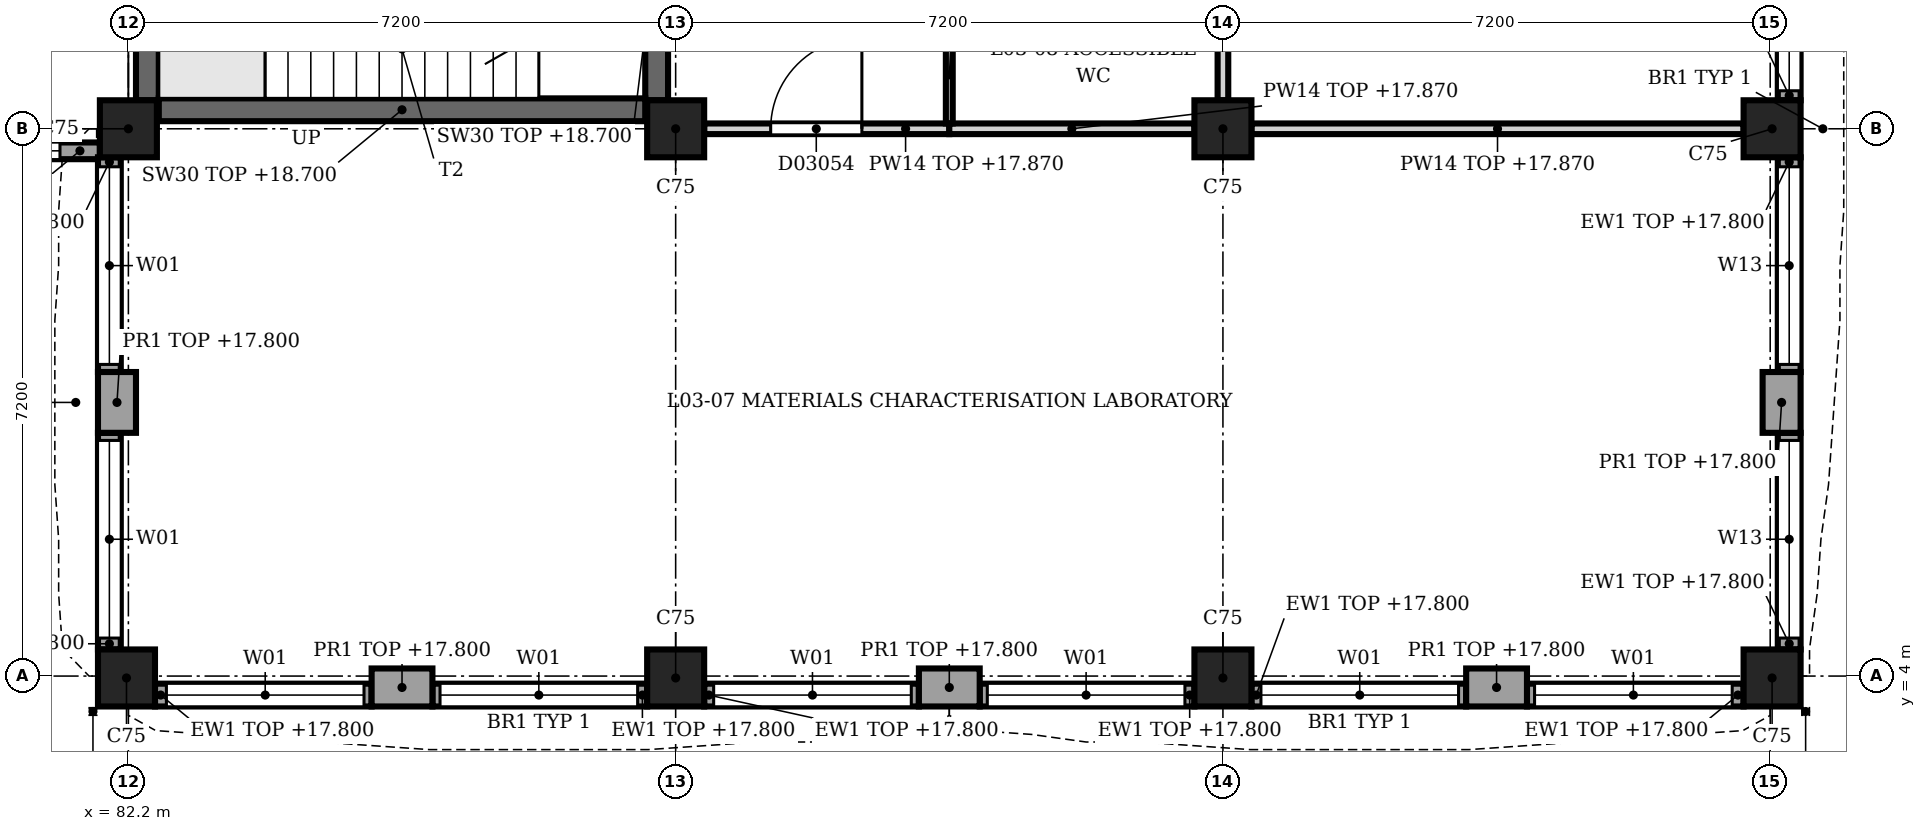
"""IFC4 building model, lengths in metres.
Left out: names, types, materials, properties, quantities, classifications, styles, units other than length and angle.
Written with IfcOpenShell. Run it as: python <this file> out.ifc"""

import sys

from ifc_helpers import new_model, si_unit, direction, frame, frame_2d, origin, origin_2d, place, context, subcontext, project, spatial, rectangle, extrude, element, fill, save


model = new_model("IFC4")
c1 = context("Model", 3, precision=1e-05, world=origin(), true_north=direction((0.0, 1.0)))
c2 = subcontext(c1, "Body", "Model", "MODEL_VIEW")
j1 = project(units=[si_unit("LENGTHUNIT", "METRE"), si_unit("PLANEANGLEUNIT", "RADIAN")], contexts=[c1])
p1 = place(None, origin())
s1 = spatial("IfcSite", under=j1, at=p1, CompositionType="ELEMENT")
p2 = place(p1, origin())
s2 = spatial("IfcBuilding", under=s1, at=p2, CompositionType="ELEMENT")
p3 = place(p2, frame((0.0, 0.0, 14.4)))
s3 = spatial("IfcBuildingStorey", under=s2, at=p3, CompositionType="ELEMENT", Elevation=14.4)
for number, where, z_axis, x_axis in (
    (1, (82.175, 3.975, 0.0), (0.0, 0.0, 1.0), (1.0, 0.0, 0.0)),
    (2, (82.2, 11.2, 0.0), (0.0, 0.0, 1.0), (1.0, 0.0, 0.0)),
    (3, (89.4, 3.975, 0.0), (0.0, 0.0, 1.0), (1.0, 0.0, 0.0)),
    (4, (89.4, 11.2, 0.0), (0.0, 0.0, 1.0), (1.0, 0.0, 0.0)),
    (5, (96.6, 3.975, 0.0), (0.0, 0.0, 1.0), (1.0, 0.0, 0.0)),
    (6, (96.6, 11.2, 0.0), (0.0, 0.0, 1.0), (1.0, 0.0, 0.0)),
    (7, (103.825, 3.975, 0.0), (0.0, 0.0, 1.0), (1.0, 0.0, 0.0)),
    (8, (103.825, 11.2, 0.0), (0.0, 0.0, 1.0), (1.0, 0.0, 0.0)),
):
    element("IfcColumn", number, at=place(p3, frame(where, z_axis=z_axis, x_axis=x_axis)), inside=s3, PredefinedType="COLUMN", context=c2, shape_type="SweptSolid", body=[
        extrude(rectangle(XDim=0.75, YDim=0.75, at=origin_2d()), origin(), (0.0, 0.0, 1.0), 4.5),
    ])
p4 = place(p3, frame((103.95, 8.0, 0.0), z_axis=(0.0, 0.0, 1.0), x_axis=(0.0, -1.0, 0.0)))
e9 = element("IfcWall", 9, at=p4, inside=s3, PredefinedType="SOLIDWALL", context=c2, shape_type="SweptSolid", body=[
    extrude(rectangle(XDim=0.8, YDim=0.5, at=frame_2d((0.4, 0.0))), origin(), (0.0, 0.0, 1.0), 3.4),
])
p5 = place(p3, frame((104.05, 14.4, 0.0), z_axis=(0.0, 0.0, 1.0), x_axis=(0.0, -1.0, 0.0)))
e10 = element("IfcWall", 10, at=p5, inside=s3, PredefinedType="SOLIDWALL", context=c2, shape_type="SweptSolid", body=[
    extrude(rectangle(XDim=2.825, YDim=0.3, at=frame_2d((1.413, 0.0))), origin(), (0.0, 0.0, 1.0), 3.4),
])
p6 = place(p5, frame((0.1, 0.0, 0.9)))
e11 = element("IfcOpeningElement", 11, at=p6, cuts=e10, PredefinedType="OPENING", context=c2, shape_type="SweptSolid", body=[
    extrude(rectangle(XDim=2.6, YDim=2.2, at=frame_2d((1.3, 1.1))), frame((0.0, 0.16, 0.0), z_axis=(0.0, -1.0, 0.0), x_axis=(1.0, 0.0, 0.0)), (0.0, 0.0, 1.0), 0.32),
])
p7 = place(p3, frame((104.05, 10.825, 0.0), z_axis=(0.0, 0.0, 1.0), x_axis=(0.0, -1.0, 0.0)))
e12 = element("IfcWall", 12, at=p7, inside=s3, PredefinedType="SOLIDWALL", context=c2, shape_type="SweptSolid", body=[
    extrude(rectangle(XDim=2.825, YDim=0.3, at=frame_2d((1.413, 0.0))), origin(), (0.0, 0.0, 1.0), 3.4),
])
p8 = place(p7, frame((0.125, 0.0, 0.9)))
e13 = element("IfcOpeningElement", 13, at=p8, cuts=e12, PredefinedType="OPENING", context=c2, shape_type="SweptSolid", body=[
    extrude(rectangle(XDim=2.6, YDim=2.2, at=frame_2d((1.3, 1.1))), frame((0.0, 0.16, 0.0), z_axis=(0.0, -1.0, 0.0), x_axis=(1.0, 0.0, 0.0)), (0.0, 0.0, 1.0), 0.32),
])
p9 = place(p3, frame((104.05, 7.2, 0.0), z_axis=(0.0, 0.0, 1.0), x_axis=(0.0, -1.0, 0.0)))
e14 = element("IfcWall", 14, at=p9, inside=s3, PredefinedType="SOLIDWALL", context=c2, shape_type="SweptSolid", body=[
    extrude(rectangle(XDim=2.85, YDim=0.3, at=frame_2d((1.425, 0.0))), origin(), (0.0, 0.0, 1.0), 3.4),
])
p10 = place(p9, frame((0.1, 0.0, 0.9)))
e15 = element("IfcOpeningElement", 15, at=p10, cuts=e14, PredefinedType="OPENING", context=c2, shape_type="SweptSolid", body=[
    extrude(rectangle(XDim=2.6, YDim=2.2, at=frame_2d((1.3, 1.1))), frame((0.0, 0.16, 0.0), z_axis=(0.0, -1.0, 0.0), x_axis=(1.0, 0.0, 0.0)), (0.0, 0.0, 1.0), 0.32),
])
p11 = place(p3, frame((100.6, 3.85, 0.0), z_axis=(0.0, 0.0, 1.0), x_axis=(-1.0, 0.0, 0.0)))
e16 = element("IfcWall", 16, at=p11, inside=s3, PredefinedType="SOLIDWALL", context=c2, shape_type="SweptSolid", body=[
    extrude(rectangle(XDim=0.8, YDim=0.5, at=frame_2d((0.4, 0.0))), origin(), (0.0, 0.0, 1.0), 3.4),
])
p12 = place(p3, frame((93.4, 3.85, 0.0), z_axis=(0.0, 0.0, 1.0), x_axis=(-1.0, 0.0, 0.0)))
e17 = element("IfcWall", 17, at=p12, inside=s3, PredefinedType="SOLIDWALL", context=c2, shape_type="SweptSolid", body=[
    extrude(rectangle(XDim=0.8, YDim=0.5, at=frame_2d((0.4, 0.0))), origin(), (0.0, 0.0, 1.0), 3.4),
])
p13 = place(p3, frame((86.2, 3.85, 0.0), z_axis=(0.0, 0.0, 1.0), x_axis=(-1.0, 0.0, 0.0)))
e18 = element("IfcWall", 18, at=p13, inside=s3, PredefinedType="SOLIDWALL", context=c2, shape_type="SweptSolid", body=[
    extrude(rectangle(XDim=0.8, YDim=0.5, at=frame_2d((0.4, 0.0))), origin(), (0.0, 0.0, 1.0), 3.4),
])
p14 = place(p3, frame((103.45, 3.75, 0.0), z_axis=(0.0, 0.0, 1.0), x_axis=(-1.0, 0.0, 0.0)))
e19 = element("IfcWall", 19, at=p14, inside=s3, PredefinedType="SOLIDWALL", context=c2, shape_type="SweptSolid", body=[
    extrude(rectangle(XDim=2.85, YDim=0.3, at=frame_2d((1.425, 0.0))), origin(), (0.0, 0.0, 1.0), 3.4),
])
p15 = place(p14, frame((0.15, 0.0, 0.9)))
e20 = element("IfcOpeningElement", 20, at=p15, cuts=e19, PredefinedType="OPENING", context=c2, shape_type="SweptSolid", body=[
    extrude(rectangle(XDim=2.6, YDim=2.4, at=frame_2d((1.3, 1.2))), frame((0.0, 0.16, 0.0), z_axis=(0.0, -1.0, 0.0), x_axis=(1.0, 0.0, 0.0)), (0.0, 0.0, 1.0), 0.32),
])
p16 = place(p3, frame((99.8, 3.75, 0.0), z_axis=(0.0, 0.0, 1.0), x_axis=(-1.0, 0.0, 0.0)))
e21 = element("IfcWall", 21, at=p16, inside=s3, PredefinedType="SOLIDWALL", context=c2, shape_type="SweptSolid", body=[
    extrude(rectangle(XDim=2.825, YDim=0.3, at=frame_2d((1.413, 0.0))), origin(), (0.0, 0.0, 1.0), 3.4),
])
p17 = place(p16, frame((0.1, 0.0, 0.9)))
e22 = element("IfcOpeningElement", 22, at=p17, cuts=e21, PredefinedType="OPENING", context=c2, shape_type="SweptSolid", body=[
    extrude(rectangle(XDim=2.6, YDim=2.4, at=frame_2d((1.3, 1.2))), frame((0.0, 0.16, 0.0), z_axis=(0.0, -1.0, 0.0), x_axis=(1.0, 0.0, 0.0)), (0.0, 0.0, 1.0), 0.32),
])
p18 = place(p3, frame((96.225, 3.75, 0.0), z_axis=(0.0, 0.0, 1.0), x_axis=(-1.0, 0.0, 0.0)))
e23 = element("IfcWall", 23, at=p18, inside=s3, PredefinedType="SOLIDWALL", context=c2, shape_type="SweptSolid", body=[
    extrude(rectangle(XDim=2.825, YDim=0.3, at=frame_2d((1.413, 0.0))), origin(), (0.0, 0.0, 1.0), 3.4),
])
p19 = place(p18, frame((0.125, 0.0, 0.9)))
e24 = element("IfcOpeningElement", 24, at=p19, cuts=e23, PredefinedType="OPENING", context=c2, shape_type="SweptSolid", body=[
    extrude(rectangle(XDim=2.6, YDim=2.4, at=frame_2d((1.3, 1.2))), frame((0.0, 0.16, 0.0), z_axis=(0.0, -1.0, 0.0), x_axis=(1.0, 0.0, 0.0)), (0.0, 0.0, 1.0), 0.32),
])
p20 = place(p3, frame((92.6, 3.75, 0.0), z_axis=(0.0, 0.0, 1.0), x_axis=(-1.0, 0.0, 0.0)))
e25 = element("IfcWall", 25, at=p20, inside=s3, PredefinedType="SOLIDWALL", context=c2, shape_type="SweptSolid", body=[
    extrude(rectangle(XDim=2.825, YDim=0.3, at=frame_2d((1.413, 0.0))), origin(), (0.0, 0.0, 1.0), 3.4),
])
p21 = place(p20, frame((0.1, 0.0, 0.9)))
e26 = element("IfcOpeningElement", 26, at=p21, cuts=e25, PredefinedType="OPENING", context=c2, shape_type="SweptSolid", body=[
    extrude(rectangle(XDim=2.6, YDim=2.4, at=frame_2d((1.3, 1.2))), frame((0.0, 0.16, 0.0), z_axis=(0.0, -1.0, 0.0), x_axis=(1.0, 0.0, 0.0)), (0.0, 0.0, 1.0), 0.32),
])
p22 = place(p3, frame((89.025, 3.75, 0.0), z_axis=(0.0, 0.0, 1.0), x_axis=(-1.0, 0.0, 0.0)))
e27 = element("IfcWall", 27, at=p22, inside=s3, PredefinedType="SOLIDWALL", context=c2, shape_type="SweptSolid", body=[
    extrude(rectangle(XDim=2.825, YDim=0.3, at=frame_2d((1.413, 0.0))), origin(), (0.0, 0.0, 1.0), 3.4),
])
p23 = place(p22, frame((0.125, 0.0, 0.9)))
e28 = element("IfcOpeningElement", 28, at=p23, cuts=e27, PredefinedType="OPENING", context=c2, shape_type="SweptSolid", body=[
    extrude(rectangle(XDim=2.6, YDim=2.4, at=frame_2d((1.3, 1.2))), frame((0.0, 0.16, 0.0), z_axis=(0.0, -1.0, 0.0), x_axis=(1.0, 0.0, 0.0)), (0.0, 0.0, 1.0), 0.32),
])
p24 = place(p3, frame((85.4, 3.75, 0.0), z_axis=(0.0, 0.0, 1.0), x_axis=(-1.0, 0.0, 0.0)))
e29 = element("IfcWall", 29, at=p24, inside=s3, PredefinedType="SOLIDWALL", context=c2, shape_type="SweptSolid", body=[
    extrude(rectangle(XDim=2.85, YDim=0.3, at=frame_2d((1.425, 0.0))), origin(), (0.0, 0.0, 1.0), 3.4),
])
p25 = place(p24, frame((0.1, 0.0, 0.9)))
e30 = element("IfcOpeningElement", 30, at=p25, cuts=e29, PredefinedType="OPENING", context=c2, shape_type="SweptSolid", body=[
    extrude(rectangle(XDim=2.6, YDim=2.4, at=frame_2d((1.3, 1.2))), frame((0.0, 0.16, 0.0), z_axis=(0.0, -1.0, 0.0), x_axis=(1.0, 0.0, 0.0)), (0.0, 0.0, 1.0), 0.32),
])
p26 = place(p3, frame((82.05, 7.2, 0.0), z_axis=(0.0, 0.0, 1.0), x_axis=(0.0, 1.0, 0.0)))
e31 = element("IfcWall", 31, at=p26, inside=s3, PredefinedType="SOLIDWALL", context=c2, shape_type="SweptSolid", body=[
    extrude(rectangle(XDim=0.8, YDim=0.5, at=frame_2d((0.4, 0.0))), origin(), (0.0, 0.0, 1.0), 3.4),
])
p27 = place(p3, frame((81.95, 4.35, 0.0), z_axis=(0.0, 0.0, 1.0), x_axis=(0.0, 1.0, 0.0)))
e32 = element("IfcWall", 32, at=p27, inside=s3, PredefinedType="SOLIDWALL", context=c2, shape_type="SweptSolid", body=[
    extrude(rectangle(XDim=2.85, YDim=0.3, at=frame_2d((1.425, 0.0))), origin(), (0.0, 0.0, 1.0), 3.4),
])
p28 = place(p27, frame((0.15, 0.0, 0.9)))
e33 = element("IfcOpeningElement", 33, at=p28, cuts=e32, PredefinedType="OPENING", context=c2, shape_type="SweptSolid", body=[
    extrude(rectangle(XDim=2.6, YDim=2.4, at=frame_2d((1.3, 1.2))), frame((0.0, 0.16, 0.0), z_axis=(0.0, -1.0, 0.0), x_axis=(1.0, 0.0, 0.0)), (0.0, 0.0, 1.0), 0.32),
])
p29 = place(p3, frame((81.95, 8.0, 0.0), z_axis=(0.0, 0.0, 1.0), x_axis=(0.0, 1.0, 0.0)))
e34 = element("IfcWall", 34, at=p29, inside=s3, PredefinedType="SOLIDWALL", context=c2, shape_type="SweptSolid", body=[
    extrude(rectangle(XDim=2.825, YDim=0.3, at=frame_2d((1.413, 0.0))), origin(), (0.0, 0.0, 1.0), 3.4),
])
p30 = place(p29, frame((0.1, 0.0, 0.9)))
e35 = element("IfcOpeningElement", 35, at=p30, cuts=e34, PredefinedType="OPENING", context=c2, shape_type="SweptSolid", body=[
    extrude(rectangle(XDim=2.6, YDim=2.4, at=frame_2d((1.3, 1.2))), frame((0.0, 0.16, 0.0), z_axis=(0.0, -1.0, 0.0), x_axis=(1.0, 0.0, 0.0)), (0.0, 0.0, 1.0), 0.32),
])
p31 = place(p3, frame((81.825, 10.91, 0.0), z_axis=(0.0, 0.0, 1.0), x_axis=(-1.0, 0.0, 0.0)))
e36 = element("IfcWall", 36, at=p31, inside=s3, PredefinedType="SOLIDWALL", context=c2, shape_type="SweptSolid", body=[
    extrude(rectangle(XDim=2.825, YDim=0.22, at=frame_2d((1.413, 0.0))), origin(), (0.0, 0.0, 1.0), 3.4),
])
p32 = place(p31, frame((0.525, 0.0, 0.45)))
e37 = element("IfcOpeningElement", 37, at=p32, cuts=e36, PredefinedType="OPENING", context=c2, shape_type="SweptSolid", body=[
    extrude(rectangle(XDim=1.8, YDim=2.7, at=frame_2d((0.9, 1.35))), frame((0.0, 0.12, 0.0), z_axis=(0.0, -1.0, 0.0), x_axis=(1.0, 0.0, 0.0)), (0.0, 0.0, 1.0), 0.24),
])
p33 = place(p3, frame((89.15, 11.575, 0.0), z_axis=(0.0, 0.0, 1.0), x_axis=(0.0, 1.0, 0.0)))
e38 = element("IfcWall", 38, at=p33, inside=s3, PredefinedType="SHEAR", context=c2, shape_type="SweptSolid", body=[
    extrude(rectangle(XDim=6.45, YDim=0.3, at=frame_2d((3.225, 0.0))), origin(), (0.0, 0.0, 1.0), 4.3),
])
p34 = place(p33, frame((4.225, 0.0, 0.0)))
e39 = element("IfcOpeningElement", 39, at=p34, cuts=e38, PredefinedType="OPENING", context=c2, shape_type="SweptSolid", body=[
    extrude(rectangle(XDim=1.2, YDim=2.1, at=frame_2d((0.6, 1.05))), frame((0.0, 0.16, 0.0), z_axis=(0.0, -1.0, 0.0), x_axis=(1.0, 0.0, 0.0)), (0.0, 0.0, 1.0), 0.32),
])
p35 = place(p3, frame((82.45, 11.575, 0.0), z_axis=(0.0, 0.0, 1.0), x_axis=(0.0, 1.0, 0.0)))
e40 = element("IfcWall", 40, at=p35, inside=s3, PredefinedType="SHEAR", context=c2, shape_type="SweptSolid", body=[
    extrude(rectangle(XDim=6.45, YDim=0.3, at=frame_2d((3.225, 0.0))), origin(), (0.0, 0.0, 1.0), 4.3),
])
p36 = place(p3, frame((82.6, 11.45, 0.0), z_axis=(0.0, 0.0, 1.0), x_axis=(1.0, 0.0, 0.0)))
e41 = element("IfcWall", 41, at=p36, inside=s3, PredefinedType="SHEAR", context=c2, shape_type="SweptSolid", body=[
    extrude(rectangle(XDim=6.4, YDim=0.3, at=frame_2d((3.2, 0.0))), origin(), (0.0, 0.0, 1.0), 4.3),
])
p37 = place(p3, frame((93.0, 11.2, 0.0), z_axis=(0.0, 0.0, 1.0), x_axis=(-1.0, 0.0, 0.0)))
e42 = element("IfcWall", 42, at=p37, inside=s3, PredefinedType="PARTITIONING", context=c2, shape_type="SweptSolid", body=[
    extrude(rectangle(XDim=3.225, YDim=0.14, at=frame_2d((1.613, 0.0))), origin(), (0.0, 0.0, 1.0), 3.47),
])
p38 = place(p37, frame((1.15, 0.0, 0.0)))
e43 = element("IfcOpeningElement", 43, at=p38, cuts=e42, PredefinedType="OPENING", context=c2, shape_type="SweptSolid", body=[
    extrude(rectangle(XDim=1.2, YDim=2.1, at=frame_2d((0.6, 1.05))), frame((0.0, 0.08, 0.0), z_axis=(0.0, -1.0, 0.0), x_axis=(1.0, 0.0, 0.0)), (0.0, 0.0, 1.0), 0.16),
])
p39 = place(p3, frame((93.0, 11.2, 0.0), z_axis=(0.0, 0.0, 1.0), x_axis=(1.0, 0.0, 0.0)))
e44 = element("IfcWall", 44, at=p39, inside=s3, PredefinedType="PARTITIONING", context=c2, shape_type="SweptSolid", body=[
    extrude(rectangle(XDim=3.225, YDim=0.14, at=frame_2d((1.613, 0.0))), origin(), (0.0, 0.0, 1.0), 3.47),
])
p40 = place(p3, frame((96.975, 11.2, 0.0), z_axis=(0.0, 0.0, 1.0), x_axis=(1.0, 0.0, 0.0)))
e45 = element("IfcWall", 45, at=p40, inside=s3, PredefinedType="PARTITIONING", context=c2, shape_type="SweptSolid", body=[
    extrude(rectangle(XDim=6.475, YDim=0.14, at=frame_2d((3.237, 0.0))), origin(), (0.0, 0.0, 1.0), 3.47),
])
p41 = place(p3, frame((93.0, 14.73, 0.0), z_axis=(0.0, 0.0, 1.0), x_axis=(0.0, -1.0, 0.0)))
e46 = element("IfcWall", 46, at=p41, inside=s3, PredefinedType="PARTITIONING", context=c2, shape_type="SweptSolid", body=[
    extrude(rectangle(XDim=3.46, YDim=0.09, at=frame_2d((1.73, 0.0))), origin(), (0.0, 0.0, 1.0), 3.82),
])
p42 = place(p41, frame((1.18, 0.0, 0.0)))
e47 = element("IfcOpeningElement", 47, at=p42, cuts=e46, PredefinedType="OPENING", context=c2, shape_type="SweptSolid", body=[
    extrude(rectangle(XDim=1.0, YDim=2.2, at=frame_2d((0.5, 1.1))), frame((0.0, 0.055, 0.0), z_axis=(0.0, -1.0, 0.0), x_axis=(1.0, 0.0, 0.0)), (0.0, 0.0, 1.0), 0.11),
])
p43 = place(p3, frame((96.6, 11.575, 0.0), z_axis=(0.0, 0.0, 1.0), x_axis=(0.0, 1.0, 0.0)))
e48 = element("IfcWall", 48, at=p43, inside=s3, PredefinedType="PARTITIONING", context=c2, shape_type="SweptSolid", body=[
    extrude(rectangle(XDim=3.155, YDim=0.14, at=frame_2d((1.578, 0.0))), origin(), (0.0, 0.0, 1.0), 3.47),
])
p44 = place(p6, origin())
e49 = element("IfcWindow", 49, at=p44, inside=s3, PartitioningType="SINGLE_PANEL", PredefinedType="WINDOW", context=c2, shape_type="SweptSolid", body=[
    extrude(rectangle(XDim=2.6, YDim=2.2, at=frame_2d((1.3, 1.1))), frame((0.0, 0.03, 0.0), z_axis=(0.0, -1.0, 0.0), x_axis=(1.0, 0.0, 0.0)), (0.0, 0.0, 1.0), 0.06),
])
fill(e11, e49)
p45 = place(p8, origin())
e50 = element("IfcWindow", 50, at=p45, inside=s3, PartitioningType="SINGLE_PANEL", PredefinedType="WINDOW", context=c2, shape_type="SweptSolid", body=[
    extrude(rectangle(XDim=2.6, YDim=2.2, at=frame_2d((1.3, 1.1))), frame((0.0, 0.03, 0.0), z_axis=(0.0, -1.0, 0.0), x_axis=(1.0, 0.0, 0.0)), (0.0, 0.0, 1.0), 0.06),
])
fill(e13, e50)
p46 = place(p10, origin())
e51 = element("IfcWindow", 51, at=p46, inside=s3, PartitioningType="SINGLE_PANEL", PredefinedType="WINDOW", context=c2, shape_type="SweptSolid", body=[
    extrude(rectangle(XDim=2.6, YDim=2.2, at=frame_2d((1.3, 1.1))), frame((0.0, 0.03, 0.0), z_axis=(0.0, -1.0, 0.0), x_axis=(1.0, 0.0, 0.0)), (0.0, 0.0, 1.0), 0.06),
])
fill(e15, e51)
p47 = place(p15, origin())
e52 = element("IfcWindow", 52, at=p47, inside=s3, PartitioningType="SINGLE_PANEL", PredefinedType="WINDOW", context=c2, shape_type="SweptSolid", body=[
    extrude(rectangle(XDim=2.6, YDim=2.4, at=frame_2d((1.3, 1.2))), frame((0.0, 0.03, 0.0), z_axis=(0.0, -1.0, 0.0), x_axis=(1.0, 0.0, 0.0)), (0.0, 0.0, 1.0), 0.06),
])
fill(e20, e52)
p48 = place(p17, origin())
e53 = element("IfcWindow", 53, at=p48, inside=s3, PartitioningType="SINGLE_PANEL", PredefinedType="WINDOW", context=c2, shape_type="SweptSolid", body=[
    extrude(rectangle(XDim=2.6, YDim=2.4, at=frame_2d((1.3, 1.2))), frame((0.0, 0.03, 0.0), z_axis=(0.0, -1.0, 0.0), x_axis=(1.0, 0.0, 0.0)), (0.0, 0.0, 1.0), 0.06),
])
fill(e22, e53)
p49 = place(p19, origin())
e54 = element("IfcWindow", 54, at=p49, inside=s3, PartitioningType="SINGLE_PANEL", PredefinedType="WINDOW", context=c2, shape_type="SweptSolid", body=[
    extrude(rectangle(XDim=2.6, YDim=2.4, at=frame_2d((1.3, 1.2))), frame((0.0, 0.03, 0.0), z_axis=(0.0, -1.0, 0.0), x_axis=(1.0, 0.0, 0.0)), (0.0, 0.0, 1.0), 0.06),
])
fill(e24, e54)
p50 = place(p21, origin())
e55 = element("IfcWindow", 55, at=p50, inside=s3, PartitioningType="SINGLE_PANEL", PredefinedType="WINDOW", context=c2, shape_type="SweptSolid", body=[
    extrude(rectangle(XDim=2.6, YDim=2.4, at=frame_2d((1.3, 1.2))), frame((0.0, 0.03, 0.0), z_axis=(0.0, -1.0, 0.0), x_axis=(1.0, 0.0, 0.0)), (0.0, 0.0, 1.0), 0.06),
])
fill(e26, e55)
p51 = place(p23, origin())
e56 = element("IfcWindow", 56, at=p51, inside=s3, PartitioningType="SINGLE_PANEL", PredefinedType="WINDOW", context=c2, shape_type="SweptSolid", body=[
    extrude(rectangle(XDim=2.6, YDim=2.4, at=frame_2d((1.3, 1.2))), frame((0.0, 0.03, 0.0), z_axis=(0.0, -1.0, 0.0), x_axis=(1.0, 0.0, 0.0)), (0.0, 0.0, 1.0), 0.06),
])
fill(e28, e56)
p52 = place(p25, origin())
e57 = element("IfcWindow", 57, at=p52, inside=s3, PartitioningType="SINGLE_PANEL", PredefinedType="WINDOW", context=c2, shape_type="SweptSolid", body=[
    extrude(rectangle(XDim=2.6, YDim=2.4, at=frame_2d((1.3, 1.2))), frame((0.0, 0.03, 0.0), z_axis=(0.0, -1.0, 0.0), x_axis=(1.0, 0.0, 0.0)), (0.0, 0.0, 1.0), 0.06),
])
fill(e30, e57)
p53 = place(p28, origin())
e58 = element("IfcWindow", 58, at=p53, inside=s3, PartitioningType="SINGLE_PANEL", PredefinedType="WINDOW", context=c2, shape_type="SweptSolid", body=[
    extrude(rectangle(XDim=2.6, YDim=2.4, at=frame_2d((1.3, 1.2))), frame((0.0, 0.03, 0.0), z_axis=(0.0, -1.0, 0.0), x_axis=(1.0, 0.0, 0.0)), (0.0, 0.0, 1.0), 0.06),
])
fill(e33, e58)
p54 = place(p30, origin())
e59 = element("IfcWindow", 59, at=p54, inside=s3, PartitioningType="SINGLE_PANEL", PredefinedType="WINDOW", context=c2, shape_type="SweptSolid", body=[
    extrude(rectangle(XDim=2.6, YDim=2.4, at=frame_2d((1.3, 1.2))), frame((0.0, 0.03, 0.0), z_axis=(0.0, -1.0, 0.0), x_axis=(1.0, 0.0, 0.0)), (0.0, 0.0, 1.0), 0.06),
])
fill(e35, e59)
p55 = place(p32, origin())
e60 = element("IfcWindow", 60, at=p55, inside=s3, PartitioningType="SINGLE_PANEL", PredefinedType="WINDOW", context=c2, shape_type="SweptSolid", body=[
    extrude(rectangle(XDim=1.8, YDim=2.7, at=frame_2d((0.9, 1.35))), frame((0.0, 0.03, 0.0), z_axis=(0.0, -1.0, 0.0), x_axis=(1.0, 0.0, 0.0)), (0.0, 0.0, 1.0), 0.06),
])
fill(e37, e60)
p56 = place(p38, origin())
e61 = element("IfcDoor", 61, at=p56, inside=s3, OperationType="SINGLE_SWING_RIGHT", PredefinedType="DOOR", context=c2, shape_type="SweptSolid", body=[
    extrude(rectangle(XDim=1.2, YDim=2.1, at=frame_2d((0.6, 1.05))), frame((0.0, 0.025, 0.0), z_axis=(0.0, -1.0, 0.0), x_axis=(1.0, 0.0, 0.0)), (0.0, 0.0, 1.0), 0.05),
])
fill(e43, e61)
save(model, sys.argv[1])
